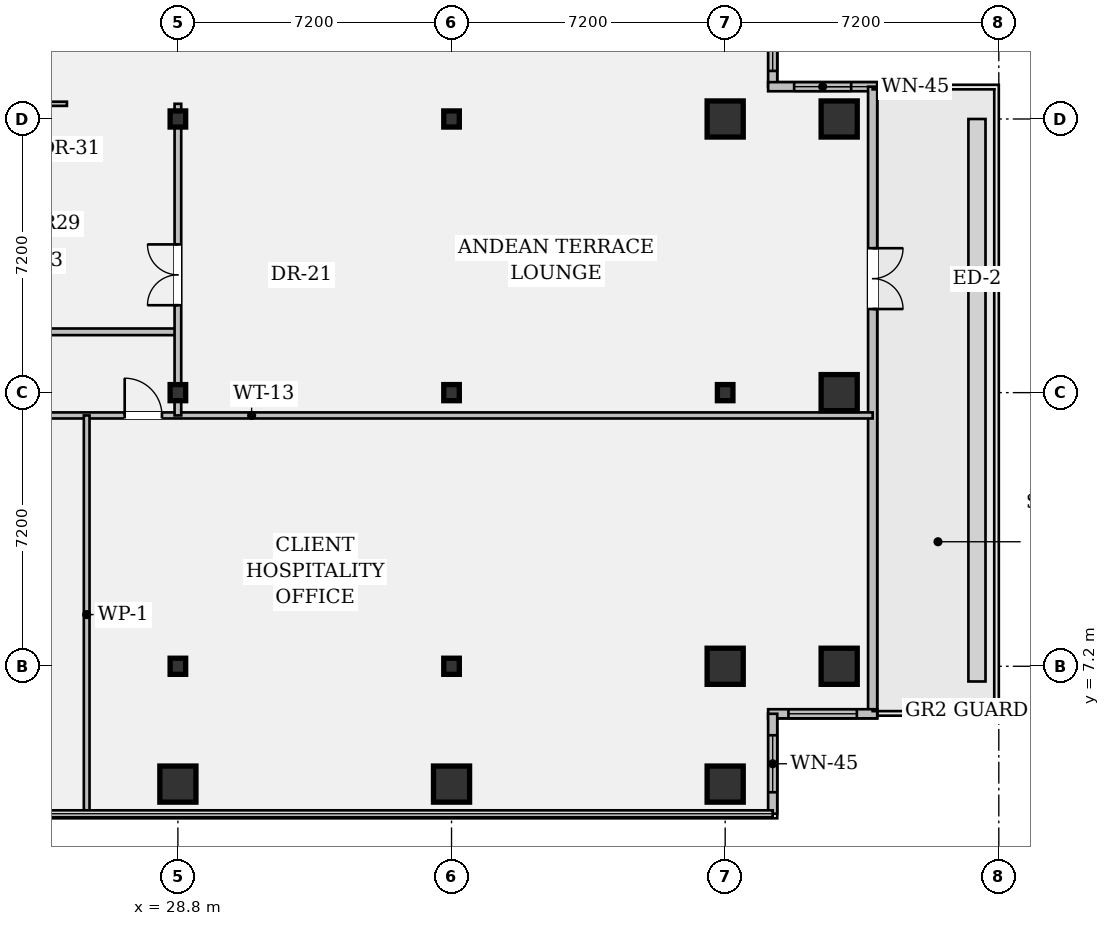
"""IFC4 building model, lengths in metres.
Left out: names, types, materials, properties, quantities, classifications, styles, units other than length and angle.
Written with IfcOpenShell. Run it as: python <this file> out.ifc"""

import sys

from ifc_helpers import new_model, si_unit, direction, frame, frame_2d, origin, origin_2d, place, context, subcontext, project, spatial, rectangle, hollow_rectangle, i_section, extrude, element, fill, save


model = new_model("IFC4")
c1 = context("Model", 3, precision=1e-05, world=origin(), true_north=direction((0.0, 1.0)))
c2 = subcontext(c1, "Body", "Model", "MODEL_VIEW")
j1 = project(units=[si_unit("LENGTHUNIT", "METRE"), si_unit("PLANEANGLEUNIT", "RADIAN")], contexts=[c1])
p1 = place(None, origin())
s1 = spatial("IfcSite", under=j1, at=p1, CompositionType="ELEMENT")
p2 = place(p1, origin())
s2 = spatial("IfcBuilding", under=s1, at=p2, CompositionType="ELEMENT")
p3 = place(p2, frame((0.0, 0.0, 97.65)))
s3 = spatial("IfcBuildingStorey", under=s2, at=p3, CompositionType="ELEMENT", Elevation=97.65)
p4 = place(p3, frame((28.8, 4.1, 0.0), z_axis=(0.0, 0.0, 1.0), x_axis=(1.0, 0.0, 0.0)))
e1 = element("IfcColumn", 1, at=p4, inside=s3, PredefinedType="COLUMN", context=c2, shape_type="SweptSolid", body=[
    extrude(hollow_rectangle(XDim=0.95, YDim=0.95, WallThickness=0.06, at=origin_2d()), origin(), (0.0, 0.0, 1.0), 4.28),
])
for number, where, z_axis, x_axis in (
    (2, (28.8, 7.2, 0.0), (0.0, 0.0, 1.0), (1.0, 0.0, 0.0)),
    (3, (28.8, 14.4, 0.0), (0.0, 0.0, 1.0), (1.0, 0.0, 0.0)),
    (4, (28.8, 21.6, 0.0), (0.0, 0.0, 1.0), (1.0, 0.0, 0.0)),
):
    element("IfcColumn", number, at=place(p3, frame(where, z_axis=z_axis, x_axis=x_axis)), inside=s3, PredefinedType="COLUMN", context=c2, shape_type="SweptSolid", body=[
        extrude(i_section(OverallWidth=0.409, OverallDepth=0.424, WebThickness=0.033, FlangeThickness=0.052, FilletRadius=0.018, at=origin_2d()), origin(), (0.0, 0.0, 1.0), 4.28),
    ])
p5 = place(p3, frame((36.0, 4.1, 0.0), z_axis=(0.0, 0.0, 1.0), x_axis=(1.0, 0.0, 0.0)))
e5 = element("IfcColumn", 5, at=p5, inside=s3, PredefinedType="COLUMN", context=c2, shape_type="SweptSolid", body=[
    extrude(hollow_rectangle(XDim=0.95, YDim=0.95, WallThickness=0.06, at=origin_2d()), origin(), (0.0, 0.0, 1.0), 4.28),
])
for number, where, z_axis, x_axis in (
    (6, (36.0, 7.2, 0.0), (0.0, 0.0, 1.0), (1.0, 0.0, 0.0)),
    (7, (36.0, 14.4, 0.0), (0.0, 0.0, 1.0), (1.0, 0.0, 0.0)),
    (8, (36.0, 21.6, 0.0), (0.0, 0.0, 1.0), (1.0, 0.0, 0.0)),
):
    element("IfcColumn", number, at=place(p3, frame(where, z_axis=z_axis, x_axis=x_axis)), inside=s3, PredefinedType="COLUMN", context=c2, shape_type="SweptSolid", body=[
        extrude(i_section(OverallWidth=0.409, OverallDepth=0.424, WebThickness=0.033, FlangeThickness=0.052, FilletRadius=0.018, at=origin_2d()), origin(), (0.0, 0.0, 1.0), 4.28),
    ])
for number, where, z_axis, x_axis in (
    (9, (43.2, 4.1, 0.0), (0.0, 0.0, 1.0), (1.0, 0.0, 0.0)),
    (10, (43.2, 7.2, 0.0), (0.0, 0.0, 1.0), (1.0, 0.0, 0.0)),
):
    element("IfcColumn", number, at=place(p3, frame(where, z_axis=z_axis, x_axis=x_axis)), inside=s3, PredefinedType="COLUMN", context=c2, shape_type="SweptSolid", body=[
        extrude(hollow_rectangle(XDim=0.95, YDim=0.95, WallThickness=0.06, at=origin_2d()), origin(), (0.0, 0.0, 1.0), 4.28),
    ])
p6 = place(p3, frame((43.2, 14.4, 0.0), z_axis=(0.0, 0.0, 1.0), x_axis=(1.0, 0.0, 0.0)))
e11 = element("IfcColumn", 11, at=p6, inside=s3, PredefinedType="COLUMN", context=c2, shape_type="SweptSolid", body=[
    extrude(i_section(OverallWidth=0.409, OverallDepth=0.424, WebThickness=0.033, FlangeThickness=0.052, FilletRadius=0.018, at=origin_2d()), origin(), (0.0, 0.0, 1.0), 4.28),
])
for number, where, z_axis, x_axis in (
    (12, (43.2, 21.6, 0.0), (0.0, 0.0, 1.0), (1.0, 0.0, 0.0)),
    (13, (46.2, 7.2, 0.0), (0.0, 0.0, 1.0), (1.0, 0.0, 0.0)),
    (14, (46.2, 14.4, 0.0), (0.0, 0.0, 1.0), (1.0, 0.0, 0.0)),
    (15, (46.2, 21.6, 0.0), (0.0, 0.0, 1.0), (1.0, 0.0, 0.0)),
):
    element("IfcColumn", number, at=place(p3, frame(where, z_axis=z_axis, x_axis=x_axis)), inside=s3, PredefinedType="COLUMN", context=c2, shape_type="SweptSolid", body=[
        extrude(hollow_rectangle(XDim=0.95, YDim=0.95, WallThickness=0.06, at=origin_2d()), origin(), (0.0, 0.0, 1.0), 4.28),
    ])
p7 = place(p3, frame((44.45, 25.08, 0.0), z_axis=(0.0, 0.0, 1.0), x_axis=(0.0, -1.0, 0.0)))
e16 = element("IfcWall", 16, at=p7, inside=s3, PredefinedType="STANDARD", context=c2, shape_type="SweptSolid", body=[
    extrude(rectangle(XDim=2.63, YDim=0.24, at=frame_2d((1.315, 0.0))), origin(), (0.0, 0.0, 1.0), 4.28),
])
p8 = place(p7, frame((0.415, 0.0, 0.95)))
e17 = element("IfcOpeningElement", 17, at=p8, cuts=e16, PredefinedType="OPENING", context=c2, shape_type="SweptSolid", body=[
    extrude(rectangle(XDim=1.8, YDim=1.35, at=frame_2d((0.9, 0.675))), frame((0.0, 0.132, 0.0), z_axis=(0.0, -1.0, 0.0), x_axis=(1.0, 0.0, 0.0)), (0.0, 0.0, 1.0), 0.264),
])
p9 = place(p3, frame((44.33, 22.45, 0.0), z_axis=(0.0, 0.0, 1.0), x_axis=(1.0, 0.0, 0.0)))
e18 = element("IfcWall", 18, at=p9, inside=s3, PredefinedType="STANDARD", context=c2, shape_type="SweptSolid", body=[
    extrude(rectangle(XDim=2.87, YDim=0.24, at=frame_2d((1.435, 0.0))), origin(), (0.0, 0.0, 1.0), 4.28),
])
p10 = place(p9, frame((0.685, 0.0, 0.95)))
e19 = element("IfcOpeningElement", 19, at=p10, cuts=e18, PredefinedType="OPENING", context=c2, shape_type="SweptSolid", body=[
    extrude(rectangle(XDim=1.5, YDim=1.8, at=frame_2d((0.75, 0.9))), frame((0.0, 0.132, 0.0), z_axis=(0.0, -1.0, 0.0), x_axis=(1.0, 0.0, 0.0)), (0.0, 0.0, 1.0), 0.264),
])
p11 = place(p3, frame((47.08, 22.45, 0.0), z_axis=(0.0, 0.0, 1.0), x_axis=(0.0, -1.0, 0.0)))
e20 = element("IfcWall", 20, at=p11, inside=s3, PredefinedType="STANDARD", context=c2, shape_type="SweptSolid", body=[
    extrude(rectangle(XDim=16.5, YDim=0.24, at=frame_2d((8.25, 0.0))), origin(), (0.0, 0.0, 1.0), 4.28),
])
p12 = place(p11, frame((4.25, 0.0, 0.0)))
e21 = element("IfcOpeningElement", 21, at=p12, cuts=e20, PredefinedType="OPENING", context=c2, shape_type="SweptSolid", body=[
    extrude(rectangle(XDim=1.6, YDim=2.2, at=frame_2d((0.8, 1.1))), frame((0.0, 0.132, 0.0), z_axis=(0.0, -1.0, 0.0), x_axis=(1.0, 0.0, 0.0)), (0.0, 0.0, 1.0), 0.264),
])
p13 = place(p3, frame((47.2, 5.95, 0.0), z_axis=(0.0, 0.0, 1.0), x_axis=(-1.0, 0.0, 0.0)))
e22 = element("IfcWall", 22, at=p13, inside=s3, PredefinedType="STANDARD", context=c2, shape_type="SweptSolid", body=[
    extrude(rectangle(XDim=2.87, YDim=0.24, at=frame_2d((1.435, 0.0))), origin(), (0.0, 0.0, 1.0), 4.28),
])
p14 = place(p13, frame((0.535, 0.0, 0.95)))
e23 = element("IfcOpeningElement", 23, at=p14, cuts=e22, PredefinedType="OPENING", context=c2, shape_type="SweptSolid", body=[
    extrude(rectangle(XDim=1.8, YDim=1.35, at=frame_2d((0.9, 0.675))), frame((0.0, 0.132, 0.0), z_axis=(0.0, -1.0, 0.0), x_axis=(1.0, 0.0, 0.0)), (0.0, 0.0, 1.0), 0.264),
])
p15 = place(p3, frame((44.45, 5.95, 0.0), z_axis=(0.0, 0.0, 1.0), x_axis=(0.0, -1.0, 0.0)))
e24 = element("IfcWall", 24, at=p15, inside=s3, PredefinedType="STANDARD", context=c2, shape_type="SweptSolid", body=[
    extrude(rectangle(XDim=2.63, YDim=0.24, at=frame_2d((1.315, 0.0))), origin(), (0.0, 0.0, 1.0), 4.28),
])
p16 = place(p15, frame((0.565, 0.0, 0.95)))
e25 = element("IfcOpeningElement", 25, at=p16, cuts=e24, PredefinedType="OPENING", context=c2, shape_type="SweptSolid", body=[
    extrude(rectangle(XDim=1.5, YDim=1.8, at=frame_2d((0.75, 0.9))), frame((0.0, 0.132, 0.0), z_axis=(0.0, -1.0, 0.0), x_axis=(1.0, 0.0, 0.0)), (0.0, 0.0, 1.0), 0.264),
])
p17 = place(p3, frame((17.35, 22.0, 0.0), z_axis=(0.0, 0.0, 1.0), x_axis=(1.0, 0.0, 0.0)))
e26 = element("IfcWall", 26, at=p17, inside=s3, PredefinedType="PARTITIONING", context=c2, shape_type="SweptSolid", body=[
    extrude(rectangle(XDim=8.53, YDim=0.11, at=frame_2d((4.265, 0.0))), origin(), (0.0, 0.0, 1.0), 3.493),
])
p18 = place(p17, frame((4.76, 0.0, 0.0)))
e27 = element("IfcOpeningElement", 27, at=p18, cuts=e26, PredefinedType="OPENING", context=c2, shape_type="SweptSolid", body=[
    extrude(rectangle(XDim=1.0, YDim=2.15, at=frame_2d((0.5, 1.075))), frame((0.0, 0.067, 0.0), z_axis=(0.0, -1.0, 0.0), x_axis=(1.0, 0.0, 0.0)), (0.0, 0.0, 1.0), 0.134),
])
p19 = place(p3, frame((14.4, 13.8, 0.0), z_axis=(0.0, 0.0, 1.0), x_axis=(1.0, 0.0, 0.0)))
e28 = element("IfcWall", 28, at=p19, inside=s3, PredefinedType="PARTITIONING", context=c2, shape_type="SweptSolid", body=[
    extrude(rectangle(XDim=32.68, YDim=0.16, at=frame_2d((16.34, 0.0))), origin(), (0.0, 0.0, 1.0), 3.493),
])
p20 = place(p19, frame((4.72, 0.0, 0.0)))
e29 = element("IfcOpeningElement", 29, at=p20, cuts=e28, PredefinedType="OPENING", context=c2, shape_type="SweptSolid", body=[
    extrude(rectangle(XDim=1.05, YDim=2.15, at=frame_2d((0.525, 1.075))), frame((0.0, 0.092, 0.0), z_axis=(0.0, -1.0, 0.0), x_axis=(1.0, 0.0, 0.0)), (0.0, 0.0, 1.0), 0.184),
])
p21 = place(p19, frame((13.0, 0.0, 0.0)))
e30 = element("IfcOpeningElement", 30, at=p21, cuts=e28, PredefinedType="OPENING", context=c2, shape_type="SweptSolid", body=[
    extrude(rectangle(XDim=0.98, YDim=2.15, at=frame_2d((0.49, 1.075))), frame((0.0, 0.092, 0.0), z_axis=(0.0, -1.0, 0.0), x_axis=(1.0, 0.0, 0.0)), (0.0, 0.0, 1.0), 0.184),
])
p22 = place(p3, frame((26.4, 3.32, 0.0), z_axis=(0.0, 0.0, 1.0), x_axis=(0.0, 1.0, 0.0)))
e31 = element("IfcWall", 31, at=p22, inside=s3, PredefinedType="PARTITIONING", context=c2, shape_type="SweptSolid", body=[
    extrude(rectangle(XDim=10.48, YDim=0.15, at=frame_2d((5.24, 0.0))), origin(), (0.0, 0.0, 1.0), 3.493),
])
p23 = place(p3, frame((17.35, 16.0, 0.0), z_axis=(0.0, 0.0, 1.0), x_axis=(1.0, 0.0, 0.0)))
e32 = element("IfcWall", 32, at=p23, inside=s3, PredefinedType="PARTITIONING", context=c2, shape_type="SweptSolid", body=[
    extrude(rectangle(XDim=11.45, YDim=0.175, at=frame_2d((5.725, 0.0))), origin(), (0.0, 0.0, 1.0), 3.493),
])
p24 = place(p23, frame((1.8, 0.0, 0.0)))
e33 = element("IfcOpeningElement", 33, at=p24, cuts=e32, PredefinedType="OPENING", context=c2, shape_type="SweptSolid", body=[
    extrude(rectangle(XDim=1.2, YDim=2.15, at=frame_2d((0.6, 1.075))), frame((0.0, 0.1, 0.0), z_axis=(0.0, -1.0, 0.0), x_axis=(1.0, 0.0, 0.0)), (0.0, 0.0, 1.0), 0.199),
])
p25 = place(p3, frame((28.8, 13.8, 0.0), z_axis=(0.0, 0.0, 1.0), x_axis=(0.0, 1.0, 0.0)))
e34 = element("IfcWall", 34, at=p25, inside=s3, PredefinedType="PARTITIONING", context=c2, shape_type="SweptSolid", body=[
    extrude(rectangle(XDim=8.2, YDim=0.175, at=frame_2d((4.1, 0.0))), origin(), (0.0, 0.0, 1.0), 3.493),
])
p26 = place(p25, frame((2.9, 0.0, 0.0)))
e35 = element("IfcOpeningElement", 35, at=p26, cuts=e34, PredefinedType="OPENING", context=c2, shape_type="SweptSolid", body=[
    extrude(rectangle(XDim=1.6, YDim=2.2, at=frame_2d((0.8, 1.1))), frame((0.0, 0.1, 0.0), z_axis=(0.0, -1.0, 0.0), x_axis=(1.0, 0.0, 0.0)), (0.0, 0.0, 1.0), 0.199),
])
p27 = place(p8, origin())
e36 = element("IfcWindow", 36, at=p27, inside=s3, PartitioningType="SINGLE_PANEL", PredefinedType="WINDOW", context=c2, shape_type="SweptSolid", body=[
    extrude(rectangle(XDim=1.8, YDim=1.35, at=frame_2d((0.9, 0.675))), frame((0.0, 0.03, 0.0), z_axis=(0.0, -1.0, 0.0), x_axis=(1.0, 0.0, 0.0)), (0.0, 0.0, 1.0), 0.06),
])
fill(e17, e36)
p28 = place(p10, origin())
e37 = element("IfcWindow", 37, at=p28, inside=s3, PartitioningType="SINGLE_PANEL", PredefinedType="WINDOW", context=c2, shape_type="SweptSolid", body=[
    extrude(rectangle(XDim=1.5, YDim=1.8, at=frame_2d((0.75, 0.9))), frame((0.0, 0.03, 0.0), z_axis=(0.0, -1.0, 0.0), x_axis=(1.0, 0.0, 0.0)), (0.0, 0.0, 1.0), 0.06),
])
fill(e19, e37)
p29 = place(p12, origin())
e38 = element("IfcDoor", 38, at=p29, inside=s3, OperationType="DOUBLE_DOOR_SINGLE_SWING", PredefinedType="DOOR", context=c2, shape_type="SweptSolid", body=[
    extrude(rectangle(XDim=1.6, YDim=2.2, at=frame_2d((0.8, 1.1))), frame((0.0, 0.025, 0.0), z_axis=(0.0, -1.0, 0.0), x_axis=(1.0, 0.0, 0.0)), (0.0, 0.0, 1.0), 0.05),
])
fill(e21, e38)
p30 = place(p14, origin())
e39 = element("IfcWindow", 39, at=p30, inside=s3, PartitioningType="SINGLE_PANEL", PredefinedType="WINDOW", context=c2, shape_type="SweptSolid", body=[
    extrude(rectangle(XDim=1.8, YDim=1.35, at=frame_2d((0.9, 0.675))), frame((0.0, 0.03, 0.0), z_axis=(0.0, -1.0, 0.0), x_axis=(1.0, 0.0, 0.0)), (0.0, 0.0, 1.0), 0.06),
])
fill(e23, e39)
p31 = place(p16, origin())
e40 = element("IfcWindow", 40, at=p31, inside=s3, PartitioningType="SINGLE_PANEL", PredefinedType="WINDOW", context=c2, shape_type="SweptSolid", body=[
    extrude(rectangle(XDim=1.5, YDim=1.8, at=frame_2d((0.75, 0.9))), frame((0.0, 0.03, 0.0), z_axis=(0.0, -1.0, 0.0), x_axis=(1.0, 0.0, 0.0)), (0.0, 0.0, 1.0), 0.06),
])
fill(e25, e40)
p32 = place(p26, origin())
e41 = element("IfcDoor", 41, at=p32, inside=s3, OperationType="DOUBLE_DOOR_SINGLE_SWING", PredefinedType="DOOR", context=c2, shape_type="SweptSolid", body=[
    extrude(rectangle(XDim=1.6, YDim=2.2, at=frame_2d((0.8, 1.1))), frame((0.0, 0.025, 0.0), z_axis=(0.0, -1.0, 0.0), x_axis=(1.0, 0.0, 0.0)), (0.0, 0.0, 1.0), 0.05),
])
fill(e35, e41)
p33 = place(p21, origin())
e42 = element("IfcDoor", 42, at=p33, inside=s3, OperationType="SINGLE_SWING_LEFT", PredefinedType="DOOR", context=c2, shape_type="SweptSolid", body=[
    extrude(rectangle(XDim=0.98, YDim=2.15, at=frame_2d((0.49, 1.075))), frame((0.0, 0.025, 0.0), z_axis=(0.0, -1.0, 0.0), x_axis=(1.0, 0.0, 0.0)), (0.0, 0.0, 1.0), 0.05),
])
fill(e30, e42)
save(model, sys.argv[1])
